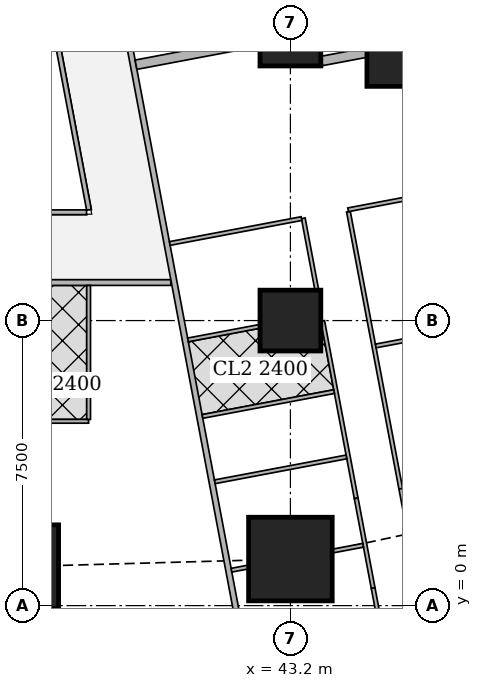
"""IFC4 building model, lengths in metres.
Left out: names, types, materials, properties, quantities, classifications, styles, units other than length and angle.
Written with IfcOpenShell. Run it as: python <this file> out.ifc"""

import sys

from ifc_helpers import new_model, si_unit, direction, frame, frame_2d, origin, origin_2d, place, context, subcontext, project, spatial, rectangle, extrude, element, fill, save


model = new_model("IFC4")
c1 = context("Model", 3, precision=1e-05, world=origin(), true_north=direction((0.0, 1.0)))
c2 = subcontext(c1, "Body", "Model", "MODEL_VIEW")
j1 = project(units=[si_unit("LENGTHUNIT", "METRE"), si_unit("PLANEANGLEUNIT", "RADIAN")], contexts=[c1])
p1 = place(None, origin())
s1 = spatial("IfcSite", under=j1, at=p1, CompositionType="ELEMENT")
p2 = place(p1, origin())
s2 = spatial("IfcBuilding", under=s1, at=p2, CompositionType="ELEMENT")
p3 = place(p2, frame((0.0, 0.0, 89.15)))
s3 = spatial("IfcBuildingStorey", under=s2, at=p3, CompositionType="ELEMENT", Elevation=89.15)
for number, where, z_axis, x_axis in (
    (1, (36.0, 1.025, 0.0), (0.0, 0.0, 1.0), (1.0, 0.0, 0.0)),
    (2, (43.2, 1.225, 0.0), (0.0, 0.0, 1.0), (1.0, 0.0, 0.0)),
):
    element("IfcColumn", number, at=place(p3, frame(where, z_axis=z_axis, x_axis=x_axis)), inside=s3, PredefinedType="COLUMN", context=c2, shape_type="SweptSolid", body=[
        extrude(rectangle(XDim=2.2, YDim=2.2, at=origin_2d()), origin(), (0.0, 0.0, 1.0), 3.75),
    ])
for number, where, z_axis, x_axis in (
    (3, (43.2, 7.5, 0.0), (0.0, 0.0, 1.0), (1.0, 0.0, 0.0)),
    (4, (43.2, 15.0, 0.0), (0.0, 0.0, 1.0), (1.0, 0.0, 0.0)),
):
    element("IfcColumn", number, at=place(p3, frame(where, z_axis=z_axis, x_axis=x_axis)), inside=s3, PredefinedType="COLUMN", context=c2, shape_type="SweptSolid", body=[
        extrude(rectangle(XDim=1.6, YDim=1.6, at=origin_2d()), origin(), (0.0, 0.0, 1.0), 3.75),
    ])
p4 = place(p3, frame((46.314, 14.763, 0.0), z_axis=(0.0, 0.0, 1.0), x_axis=(1.0, 0.0, 0.0)))
e5 = element("IfcColumn", 5, at=p4, inside=s3, PredefinedType="COLUMN", context=c2, shape_type="SweptSolid", body=[
    extrude(rectangle(XDim=2.2, YDim=2.2, at=origin_2d()), origin(), (0.0, 0.0, 1.0), 3.75),
])
p5 = place(p3, frame((50.653, 2.703, 0.0), z_axis=(0.0, 0.0, 1.0), x_axis=(-0.185612026696, 0.982623109613, 0.0)))
e6 = element("IfcWall", 6, at=p5, inside=s3, PredefinedType="SOLIDWALL", context=c2, shape_type="SweptSolid", body=[
    extrude(rectangle(XDim=41.393, YDim=0.2, at=frame_2d((20.697, 0.0))), origin(), (0.0, 0.0, 1.0), 3.5),
])
p6 = place(p5, frame((1.633, 0.0, 0.9)))
e7 = element("IfcOpeningElement", 7, at=p6, cuts=e6, PredefinedType="OPENING", context=c2, shape_type="SweptSolid", body=[
    extrude(rectangle(XDim=1.8, YDim=1.5, at=frame_2d((0.9, 0.75))), frame((0.0, 0.11, 0.0), z_axis=(0.0, -1.0, 0.0), x_axis=(1.0, 0.0, 0.0)), (0.0, 0.0, 1.0), 0.22),
])
p7 = place(p5, frame((6.032, 0.0, 0.9)))
e8 = element("IfcOpeningElement", 8, at=p7, cuts=e6, PredefinedType="OPENING", context=c2, shape_type="SweptSolid", body=[
    extrude(rectangle(XDim=1.8, YDim=1.5, at=frame_2d((0.9, 0.75))), frame((0.0, 0.11, 0.0), z_axis=(0.0, -1.0, 0.0), x_axis=(1.0, 0.0, 0.0)), (0.0, 0.0, 1.0), 0.22),
])
p8 = place(p5, frame((9.848, 0.0, 0.9)))
e9 = element("IfcOpeningElement", 9, at=p8, cuts=e6, PredefinedType="OPENING", context=c2, shape_type="SweptSolid", body=[
    extrude(rectangle(XDim=1.8, YDim=1.5, at=frame_2d((0.9, 0.75))), frame((0.0, 0.11, 0.0), z_axis=(0.0, -1.0, 0.0), x_axis=(1.0, 0.0, 0.0)), (0.0, 0.0, 1.0), 0.22),
])
p9 = place(p5, frame((13.664, 0.0, 0.9)))
e10 = element("IfcOpeningElement", 10, at=p9, cuts=e6, PredefinedType="OPENING", context=c2, shape_type="SweptSolid", body=[
    extrude(rectangle(XDim=1.8, YDim=1.5, at=frame_2d((0.9, 0.75))), frame((0.0, 0.11, 0.0), z_axis=(0.0, -1.0, 0.0), x_axis=(1.0, 0.0, 0.0)), (0.0, 0.0, 1.0), 0.22),
])
p10 = place(p5, frame((17.481, 0.0, 0.9)))
e11 = element("IfcOpeningElement", 11, at=p10, cuts=e6, PredefinedType="OPENING", context=c2, shape_type="SweptSolid", body=[
    extrude(rectangle(XDim=1.8, YDim=1.5, at=frame_2d((0.9, 0.75))), frame((0.0, 0.11, 0.0), z_axis=(0.0, -1.0, 0.0), x_axis=(1.0, 0.0, 0.0)), (0.0, 0.0, 1.0), 0.22),
])
p11 = place(p5, frame((21.297, 0.0, 0.9)))
e12 = element("IfcOpeningElement", 12, at=p11, cuts=e6, PredefinedType="OPENING", context=c2, shape_type="SweptSolid", body=[
    extrude(rectangle(XDim=1.8, YDim=1.5, at=frame_2d((0.9, 0.75))), frame((0.0, 0.11, 0.0), z_axis=(0.0, -1.0, 0.0), x_axis=(1.0, 0.0, 0.0)), (0.0, 0.0, 1.0), 0.22),
])
p12 = place(p5, frame((25.113, 0.0, 0.9)))
e13 = element("IfcOpeningElement", 13, at=p12, cuts=e6, PredefinedType="OPENING", context=c2, shape_type="SweptSolid", body=[
    extrude(rectangle(XDim=1.8, YDim=1.5, at=frame_2d((0.9, 0.75))), frame((0.0, 0.11, 0.0), z_axis=(0.0, -1.0, 0.0), x_axis=(1.0, 0.0, 0.0)), (0.0, 0.0, 1.0), 0.22),
])
p13 = place(p5, frame((28.93, 0.0, 0.9)))
e14 = element("IfcOpeningElement", 14, at=p13, cuts=e6, PredefinedType="OPENING", context=c2, shape_type="SweptSolid", body=[
    extrude(rectangle(XDim=1.8, YDim=1.5, at=frame_2d((0.9, 0.75))), frame((0.0, 0.11, 0.0), z_axis=(0.0, -1.0, 0.0), x_axis=(1.0, 0.0, 0.0)), (0.0, 0.0, 1.0), 0.22),
])
p14 = place(p5, frame((32.746, 0.0, 0.9)))
e15 = element("IfcOpeningElement", 15, at=p14, cuts=e6, PredefinedType="OPENING", context=c2, shape_type="SweptSolid", body=[
    extrude(rectangle(XDim=1.8, YDim=1.5, at=frame_2d((0.9, 0.75))), frame((0.0, 0.11, 0.0), z_axis=(0.0, -1.0, 0.0), x_axis=(1.0, 0.0, 0.0)), (0.0, 0.0, 1.0), 0.22),
])
p15 = place(p5, frame((36.481, 0.0, 0.9)))
e16 = element("IfcOpeningElement", 16, at=p15, cuts=e6, PredefinedType="OPENING", context=c2, shape_type="SweptSolid", body=[
    extrude(rectangle(XDim=1.8, YDim=1.5, at=frame_2d((0.9, 0.75))), frame((0.0, 0.11, 0.0), z_axis=(0.0, -1.0, 0.0), x_axis=(1.0, 0.0, 0.0)), (0.0, 0.0, 1.0), 0.22),
])
p16 = place(p3, frame((40.053, 8.5, 0.0), z_axis=(0.0, 0.0, 1.0), x_axis=(-1.0, 0.0, 0.0)))
e17 = element("IfcWall", 17, at=p16, inside=s3, PredefinedType="SOLIDWALL", context=c2, shape_type="SweptSolid", body=[
    extrude(rectangle(XDim=31.703, YDim=0.15, at=frame_2d((15.852, 0.0))), origin(), (0.0, 0.0, 1.0), 3.5),
])
p17 = place(p16, frame((28.103, 0.0, 0.0)))
e18 = element("IfcOpeningElement", 18, at=p17, cuts=e17, PredefinedType="OPENING", context=c2, shape_type="SweptSolid", body=[
    extrude(rectangle(XDim=1.0, YDim=2.1, at=frame_2d((0.5, 1.05))), frame((0.0, 0.085, 0.0), z_axis=(0.0, -1.0, 0.0), x_axis=(1.0, 0.0, 0.0)), (0.0, 0.0, 1.0), 0.17),
])
p18 = place(p16, frame((19.953, 0.0, 0.0)))
e19 = element("IfcOpeningElement", 19, at=p18, cuts=e17, PredefinedType="OPENING", context=c2, shape_type="SweptSolid", body=[
    extrude(rectangle(XDim=1.0, YDim=2.1, at=frame_2d((0.5, 1.05))), frame((0.0, 0.085, 0.0), z_axis=(0.0, -1.0, 0.0), x_axis=(1.0, 0.0, 0.0)), (0.0, 0.0, 1.0), 0.17),
])
p19 = place(p16, frame((12.753, 0.0, 0.0)))
e20 = element("IfcOpeningElement", 20, at=p19, cuts=e17, PredefinedType="OPENING", context=c2, shape_type="SweptSolid", body=[
    extrude(rectangle(XDim=1.0, YDim=2.1, at=frame_2d((0.5, 1.05))), frame((0.0, 0.085, 0.0), z_axis=(0.0, -1.0, 0.0), x_axis=(1.0, 0.0, 0.0)), (0.0, 0.0, 1.0), 0.17),
])
p20 = place(p16, frame((0.15, 0.0, 0.0)))
e21 = element("IfcOpeningElement", 21, at=p20, cuts=e17, PredefinedType="OPENING", context=c2, shape_type="SweptSolid", body=[
    extrude(rectangle(XDim=1.0, YDim=2.1, at=frame_2d((0.5, 1.05))), frame((0.0, 0.085, 0.0), z_axis=(0.0, -1.0, 0.0), x_axis=(1.0, 0.0, 0.0)), (0.0, 0.0, 1.0), 0.17),
])
p21 = place(p3, frame((33.127, 45.65, 0.0), z_axis=(0.0, 0.0, 1.0), x_axis=(0.185598547723, -0.98262565562, 0.0)))
e22 = element("IfcWall", 22, at=p21, inside=s3, PredefinedType="SOLIDWALL", context=c2, shape_type="SweptSolid", body=[
    extrude(rectangle(XDim=47.118, YDim=0.15, at=frame_2d((23.559, 0.0))), origin(), (0.0, 0.0, 1.0), 2.2),
])
p22 = place(p21, frame((15.285, 0.0, 0.0)))
e23 = element("IfcOpeningElement", 23, at=p22, cuts=e22, PredefinedType="OPENING", context=c2, shape_type="SweptSolid", body=[
    extrude(rectangle(XDim=1.0, YDim=2.1, at=frame_2d((0.5, 1.05))), frame((0.0, 0.085, 0.0), z_axis=(0.0, -1.0, 0.0), x_axis=(1.0, 0.0, 0.0)), (0.0, 0.0, 1.0), 0.17),
])
p23 = place(p21, frame((19.102, 0.0, 0.0)))
e24 = element("IfcOpeningElement", 24, at=p23, cuts=e22, PredefinedType="OPENING", context=c2, shape_type="SweptSolid", body=[
    extrude(rectangle(XDim=1.0, YDim=2.1, at=frame_2d((0.5, 1.05))), frame((0.0, 0.085, 0.0), z_axis=(0.0, -1.0, 0.0), x_axis=(1.0, 0.0, 0.0)), (0.0, 0.0, 1.0), 0.17),
])
p24 = place(p21, frame((33.88, 0.0, 0.0)))
e25 = element("IfcOpeningElement", 25, at=p24, cuts=e22, PredefinedType="OPENING", context=c2, shape_type="SweptSolid", body=[
    extrude(rectangle(XDim=1.0, YDim=2.1, at=frame_2d((0.5, 1.05))), frame((0.0, 0.085, 0.0), z_axis=(0.0, -1.0, 0.0), x_axis=(1.0, 0.0, 0.0)), (0.0, 0.0, 1.0), 0.17),
])
p25 = place(p3, frame((37.89, 4.85, 0.0), z_axis=(0.0, 0.0, 1.0), x_axis=(-1.0, 0.0, 0.0)))
e26 = element("IfcWall", 26, at=p25, inside=s3, PredefinedType="PARTITIONING", context=c2, shape_type="SweptSolid", body=[
    extrude(rectangle(XDim=1.765, YDim=0.1, at=frame_2d((0.882, 0.0))), origin(), (0.0, 0.0, 1.0), 3.5),
])
p26 = place(p25, frame((0.49, 0.0, 0.0)))
e27 = element("IfcOpeningElement", 27, at=p26, cuts=e26, PredefinedType="OPENING", context=c2, shape_type="SweptSolid", body=[
    extrude(rectangle(XDim=0.9, YDim=2.1, at=frame_2d((0.45, 1.05))), frame((0.0, 0.06, 0.0), z_axis=(0.0, -1.0, 0.0), x_axis=(1.0, 0.0, 0.0)), (0.0, 0.0, 1.0), 0.12),
])
p27 = place(p3, frame((37.89, 4.9, 0.0), z_axis=(0.0, 0.0, 1.0), x_axis=(0.0, 1.0, 0.0)))
e28 = element("IfcWall", 28, at=p27, inside=s3, PredefinedType="PARTITIONING", context=c2, shape_type="SweptSolid", body=[
    extrude(rectangle(XDim=3.525, YDim=0.1, at=frame_2d((1.763, 0.0))), origin(), (0.0, 0.0, 1.0), 3.5),
])
p28 = place(p3, frame((44.727, 10.366, 0.0), z_axis=(0.0, 0.0, 1.0), x_axis=(0.185678775129, -0.982610498858, 0.0)))
e29 = element("IfcWall", 29, at=p28, inside=s3, PredefinedType="PARTITIONING", context=c2, shape_type="SweptSolid", body=[
    extrude(rectangle(XDim=7.421, YDim=0.1, at=frame_2d((3.71, 0.0))), origin(), (0.0, 0.0, 1.0), 3.5),
])
p29 = place(p28, frame((0.151, 0.0, 0.0)))
e30 = element("IfcOpeningElement", 30, at=p29, cuts=e29, PredefinedType="OPENING", context=c2, shape_type="SweptSolid", body=[
    extrude(rectangle(XDim=0.9, YDim=2.1, at=frame_2d((0.45, 1.05))), frame((0.0, 0.06, 0.0), z_axis=(0.0, -1.0, 0.0), x_axis=(1.0, 0.0, 0.0)), (0.0, 0.0, 1.0), 0.12),
])
p30 = place(p28, frame((4.55, 0.0, 0.0)))
e31 = element("IfcOpeningElement", 31, at=p30, cuts=e29, PredefinedType="OPENING", context=c2, shape_type="SweptSolid", body=[
    extrude(rectangle(XDim=0.9, YDim=2.1, at=frame_2d((0.45, 1.05))), frame((0.0, 0.06, 0.0), z_axis=(0.0, -1.0, 0.0), x_axis=(1.0, 0.0, 0.0)), (0.0, 0.0, 1.0), 0.12),
])
p31 = place(p3, frame((46.105, 3.074, 0.0), z_axis=(0.0, 0.0, 1.0), x_axis=(0.185897769544, -0.982569091351, 0.0)))
e32 = element("IfcWall", 32, at=p31, inside=s3, PredefinedType="PARTITIONING", context=c2, shape_type="SweptSolid", body=[
    extrude(rectangle(XDim=1.044, YDim=0.1, at=frame_2d((0.522, 0.0))), origin(), (0.0, 0.0, 1.0), 2.05),
])
p32 = place(p3, frame((43.539, 10.192, 0.0), z_axis=(0.0, 0.0, 1.0), x_axis=(0.185366049966, -0.982669541362, 0.0)))
e33 = element("IfcWall", 33, at=p32, inside=s3, PredefinedType="PARTITIONING", context=c2, shape_type="SweptSolid", body=[
    extrude(rectangle(XDim=1.915, YDim=0.1, at=frame_2d((0.958, 0.0))), origin(), (0.0, 0.0, 1.0), 3.5),
])
p33 = place(p3, frame((44.049, 7.49, 0.0), z_axis=(0.0, 0.0, 1.0), x_axis=(0.185666332607, -0.982612849975, 0.0)))
e34 = element("IfcWall", 34, at=p33, inside=s3, PredefinedType="PARTITIONING", context=c2, shape_type="SweptSolid", body=[
    extrude(rectangle(XDim=4.75, YDim=0.1, at=frame_2d((2.375, 0.0))), origin(), (0.0, 0.0, 1.0), 3.5),
])
p34 = place(p33, frame((0.8, 0.0, 0.0)))
e35 = element("IfcOpeningElement", 35, at=p34, cuts=e34, PredefinedType="OPENING", context=c2, shape_type="SweptSolid", body=[
    extrude(rectangle(XDim=0.9, YDim=2.1, at=frame_2d((0.45, 1.05))), frame((0.0, 0.06, 0.0), z_axis=(0.0, -1.0, 0.0), x_axis=(1.0, 0.0, 0.0)), (0.0, 0.0, 1.0), 0.12),
])
p35 = place(p33, frame((2.315, 0.0, 0.0)))
e36 = element("IfcOpeningElement", 36, at=p35, cuts=e34, PredefinedType="OPENING", context=c2, shape_type="SweptSolid", body=[
    extrude(rectangle(XDim=0.9, YDim=2.1, at=frame_2d((0.45, 1.05))), frame((0.0, 0.06, 0.0), z_axis=(0.0, -1.0, 0.0), x_axis=(1.0, 0.0, 0.0)), (0.0, 0.0, 1.0), 0.12),
])
p36 = place(p3, frame((44.931, 2.823, 0.0), z_axis=(0.0, 0.0, 1.0), x_axis=(0.185631845838, -0.982619365681, 0.0)))
e37 = element("IfcWall", 37, at=p36, inside=s3, PredefinedType="PARTITIONING", context=c2, shape_type="SweptSolid", body=[
    extrude(rectangle(XDim=2.403, YDim=0.1, at=frame_2d((1.201, 0.0))), origin(), (0.0, 0.0, 1.0), 2.05),
])
p37 = place(p3, frame((45.377, 0.462, 0.0), z_axis=(0.0, 0.0, 1.0), x_axis=(0.185513480919, -0.982641719243, 0.0)))
e38 = element("IfcWall", 38, at=p37, inside=s3, PredefinedType="PARTITIONING", context=c2, shape_type="SweptSolid", body=[
    extrude(rectangle(XDim=1.095, YDim=0.1, at=frame_2d((0.547, 0.0))), origin(), (0.0, 0.0, 1.0), 3.5),
])
p38 = place(p3, frame((48.943, 11.213, 0.0), z_axis=(0.0, 0.0, 1.0), x_axis=(-0.982633535512, -0.185556823879, 0.0)))
e39 = element("IfcWall", 39, at=p38, inside=s3, PredefinedType="PARTITIONING", context=c2, shape_type="SweptSolid", body=[
    extrude(rectangle(XDim=4.3, YDim=0.1, at=frame_2d((2.15, 0.0))), origin(), (0.0, 0.0, 1.0), 2.2),
])
p39 = place(p3, frame((46.62, 7.053, 0.0), z_axis=(0.0, 0.0, 1.0), x_axis=(-0.982749355621, -0.18494243436, 0.0)))
e40 = element("IfcWall", 40, at=p39, inside=s3, PredefinedType="PARTITIONING", context=c2, shape_type="SweptSolid", body=[
    extrude(rectangle(XDim=1.195, YDim=0.1, at=frame_2d((0.597, 0.0))), origin(), (0.0, 0.0, 1.0), 2.05),
])
p40 = place(p3, frame((43.49, 10.183, 0.0), z_axis=(0.0, 0.0, 1.0), x_axis=(-0.982588017646, -0.185797706064, 0.0)))
e41 = element("IfcWall", 41, at=p40, inside=s3, PredefinedType="PARTITIONING", context=c2, shape_type="SweptSolid", body=[
    extrude(rectangle(XDim=3.525, YDim=0.1, at=frame_2d((1.763, 0.0))), origin(), (0.0, 0.0, 1.0), 3.5),
])
p41 = place(p40, frame((1.325, 0.0, 0.0)))
e42 = element("IfcOpeningElement", 42, at=p41, cuts=e41, PredefinedType="OPENING", context=c2, shape_type="SweptSolid", body=[
    extrude(rectangle(XDim=0.9, YDim=2.1, at=frame_2d((0.45, 1.05))), frame((0.0, 0.06, 0.0), z_axis=(0.0, -1.0, 0.0), x_axis=(1.0, 0.0, 0.0)), (0.0, 0.0, 1.0), 0.12),
])
p42 = place(p3, frame((42.39, 7.347, 0.0), z_axis=(0.0, 0.0, 1.0), x_axis=(-0.982633642782, -0.185556255819, 0.0)))
e43 = element("IfcWall", 43, at=p42, inside=s3, PredefinedType="PARTITIONING", context=c2, shape_type="SweptSolid", body=[
    extrude(rectangle(XDim=1.918, YDim=0.1, at=frame_2d((0.959, 0.0))), origin(), (0.0, 0.0, 1.0), 3.5),
])
p43 = place(p3, frame((45.114, 1.587, 0.0), z_axis=(0.0, 0.0, 1.0), x_axis=(-0.982624706348, -0.185603573443, 0.0)))
e44 = element("IfcWall", 44, at=p43, inside=s3, PredefinedType="PARTITIONING", context=c2, shape_type="SweptSolid", body=[
    extrude(rectangle(XDim=0.818, YDim=0.1, at=frame_2d((0.409, 0.0))), origin(), (0.0, 0.0, 1.0), 2.05),
])
p44 = place(p3, frame((42.09, 1.015, 0.0), z_axis=(0.0, 0.0, 1.0), x_axis=(-0.982680384557, -0.185308558375, 0.0)))
e45 = element("IfcWall", 45, at=p44, inside=s3, PredefinedType="PARTITIONING", context=c2, shape_type="SweptSolid", body=[
    extrude(rectangle(XDim=0.448, YDim=0.1, at=frame_2d((0.224, 0.0))), origin(), (0.0, 0.0, 1.0), 2.05),
])
p45 = place(p3, frame((44.35, 5.631, 0.0), z_axis=(0.0, 0.0, 1.0), x_axis=(-0.982638553676, -0.185530247748, 0.0)))
e46 = element("IfcWall", 46, at=p45, inside=s3, PredefinedType="PARTITIONING", context=c2, shape_type="SweptSolid", body=[
    extrude(rectangle(XDim=3.525, YDim=0.1, at=frame_2d((1.763, 0.0))), origin(), (0.0, 0.0, 1.0), 3.5),
])
p46 = place(p3, frame((45.19, 14.55, 0.0), z_axis=(0.0, 0.0, 1.0), x_axis=(-0.982666604435, -0.185381618634, 0.0)))
e47 = element("IfcWall", 47, at=p46, inside=s3, PredefinedType="SOLIDWALL", context=c2, shape_type="SweptSolid", body=[
    extrude(rectangle(XDim=1.187, YDim=0.25, at=frame_2d((0.593, 0.0))), origin(), (0.0, 0.0, 1.0), 3.5),
])
p47 = place(p3, frame((42.376, 14.844, 0.0), z_axis=(0.0, 0.0, 1.0), x_axis=(-0.982610440948, -0.18567908159, 0.0)))
e48 = element("IfcWall", 48, at=p47, inside=s3, PredefinedType="SOLIDWALL", context=c2, shape_type="SweptSolid", body=[
    extrude(rectangle(XDim=3.296, YDim=0.25, at=frame_2d((1.648, 0.0))), origin(), (0.0, 0.0, 1.0), 3.5),
])
p48 = place(p3, frame((41.21, 3.258, 0.0), z_axis=(0.0, 0.0, 1.0), x_axis=(0.982638553676, 0.185530247748, 0.0)))
e49 = element("IfcWall", 49, at=p48, inside=s3, PredefinedType="PARTITIONING", context=c2, shape_type="SweptSolid", body=[
    extrude(rectangle(XDim=3.525, YDim=0.1, at=frame_2d((1.763, 0.0))), origin(), (0.0, 0.0, 1.0), 3.5),
])
p49 = place(p48, frame((1.65, 0.0, 0.0)))
e50 = element("IfcOpeningElement", 50, at=p49, cuts=e49, PredefinedType="OPENING", context=c2, shape_type="SweptSolid", body=[
    extrude(rectangle(XDim=0.9, YDim=2.1, at=frame_2d((0.45, 1.05))), frame((0.0, 0.06, 0.0), z_axis=(0.0, -1.0, 0.0), x_axis=(1.0, 0.0, 0.0)), (0.0, 0.0, 1.0), 0.12),
])
p50 = place(p3, frame((28.95, 10.35, 0.0), z_axis=(0.0, 0.0, 1.0), x_axis=(1.0, 0.0, 0.0)))
e51 = element("IfcWall", 51, at=p50, inside=s3, PredefinedType="PARTITIONING", context=c2, shape_type="SweptSolid", body=[
    extrude(rectangle(XDim=8.886, YDim=0.125, at=frame_2d((4.443, 0.0))), origin(), (0.0, 0.0, 1.0), 3.5),
])
p51 = place(p3, frame((37.9, 10.413, 0.0), z_axis=(0.0, 0.0, 1.0), x_axis=(-0.185589740669, 0.982627319058, 0.0)))
e52 = element("IfcWall", 52, at=p51, inside=s3, PredefinedType="PARTITIONING", context=c2, shape_type="SweptSolid", body=[
    extrude(rectangle(XDim=24.602, YDim=0.125, at=frame_2d((12.301, 0.0))), origin(), (0.0, 0.0, 1.0), 2.5),
])
p52 = place(p51, frame((0.708, 0.0, 0.0)))
e53 = element("IfcOpeningElement", 53, at=p52, cuts=e52, PredefinedType="OPENING", context=c2, shape_type="SweptSolid", body=[
    extrude(rectangle(XDim=1.0, YDim=2.1, at=frame_2d((0.5, 1.05))), frame((0.0, 0.073, 0.0), z_axis=(0.0, -1.0, 0.0), x_axis=(1.0, 0.0, 0.0)), (0.0, 0.0, 1.0), 0.145),
])
p53 = place(p51, frame((5.75, 0.0, 0.0)))
e54 = element("IfcOpeningElement", 54, at=p53, cuts=e52, PredefinedType="OPENING", context=c2, shape_type="SweptSolid", body=[
    extrude(rectangle(XDim=1.0, YDim=2.1, at=frame_2d((0.5, 1.05))), frame((0.0, 0.073, 0.0), z_axis=(0.0, -1.0, 0.0), x_axis=(1.0, 0.0, 0.0)), (0.0, 0.0, 1.0), 0.145),
])
p54 = place(p51, frame((13.124, 0.0, 0.0)))
e55 = element("IfcOpeningElement", 55, at=p54, cuts=e52, PredefinedType="OPENING", context=c2, shape_type="SweptSolid", body=[
    extrude(rectangle(XDim=1.0, YDim=2.1, at=frame_2d((0.5, 1.05))), frame((0.0, 0.073, 0.0), z_axis=(0.0, -1.0, 0.0), x_axis=(1.0, 0.0, 0.0)), (0.0, 0.0, 1.0), 0.145),
])
p55 = place(p51, frame((16.94, 0.0, 0.0)))
e56 = element("IfcOpeningElement", 56, at=p55, cuts=e52, PredefinedType="OPENING", context=c2, shape_type="SweptSolid", body=[
    extrude(rectangle(XDim=1.0, YDim=2.1, at=frame_2d((0.5, 1.05))), frame((0.0, 0.073, 0.0), z_axis=(0.0, -1.0, 0.0), x_axis=(1.0, 0.0, 0.0)), (0.0, 0.0, 1.0), 0.145),
])
p56 = place(p51, frame((21.0, 0.0, 0.0)))
e57 = element("IfcOpeningElement", 57, at=p56, cuts=e52, PredefinedType="OPENING", context=c2, shape_type="SweptSolid", body=[
    extrude(rectangle(XDim=1.0, YDim=2.1, at=frame_2d((0.5, 1.05))), frame((0.0, 0.073, 0.0), z_axis=(0.0, -1.0, 0.0), x_axis=(1.0, 0.0, 0.0)), (0.0, 0.0, 1.0), 0.145),
])
p57 = place(p26, origin())
e58 = element("IfcDoor", 58, at=p57, inside=s3, OperationType="SINGLE_SWING_LEFT", PredefinedType="DOOR", context=c2, shape_type="SweptSolid", body=[
    extrude(rectangle(XDim=0.9, YDim=2.1, at=frame_2d((0.45, 1.05))), frame((0.0, 0.025, 0.0), z_axis=(0.0, -1.0, 0.0), x_axis=(1.0, 0.0, 0.0)), (0.0, 0.0, 1.0), 0.05),
])
fill(e27, e58)
p58 = place(p20, origin())
e59 = element("IfcDoor", 59, at=p58, inside=s3, OperationType="SINGLE_SWING_LEFT", PredefinedType="DOOR", context=c2, shape_type="SweptSolid", body=[
    extrude(rectangle(XDim=1.0, YDim=2.1, at=frame_2d((0.5, 1.05))), frame((0.0, 0.025, 0.0), z_axis=(0.0, -1.0, 0.0), x_axis=(1.0, 0.0, 0.0)), (0.0, 0.0, 1.0), 0.05),
])
fill(e21, e59)
p59 = place(p29, origin())
e60 = element("IfcDoor", 60, at=p59, inside=s3, OperationType="SINGLE_SWING_LEFT", PredefinedType="DOOR", context=c2, shape_type="SweptSolid", body=[
    extrude(rectangle(XDim=0.9, YDim=2.1, at=frame_2d((0.45, 1.05))), frame((0.0, 0.025, 0.0), z_axis=(0.0, -1.0, 0.0), x_axis=(1.0, 0.0, 0.0)), (0.0, 0.0, 1.0), 0.05),
])
fill(e30, e60)
p60 = place(p30, origin())
e61 = element("IfcDoor", 61, at=p60, inside=s3, OperationType="SINGLE_SWING_LEFT", PredefinedType="DOOR", context=c2, shape_type="SweptSolid", body=[
    extrude(rectangle(XDim=0.9, YDim=2.1, at=frame_2d((0.45, 1.05))), frame((0.0, 0.025, 0.0), z_axis=(0.0, -1.0, 0.0), x_axis=(1.0, 0.0, 0.0)), (0.0, 0.0, 1.0), 0.05),
])
fill(e31, e61)
p61 = place(p34, origin())
e62 = element("IfcDoor", 62, at=p61, inside=s3, OperationType="SINGLE_SWING_LEFT", PredefinedType="DOOR", context=c2, shape_type="SweptSolid", body=[
    extrude(rectangle(XDim=0.9, YDim=2.1, at=frame_2d((0.45, 1.05))), frame((0.0, 0.025, 0.0), z_axis=(0.0, -1.0, 0.0), x_axis=(1.0, 0.0, 0.0)), (0.0, 0.0, 1.0), 0.05),
])
fill(e35, e62)
p62 = place(p35, origin())
e63 = element("IfcDoor", 63, at=p62, inside=s3, OperationType="SINGLE_SWING_LEFT", PredefinedType="DOOR", context=c2, shape_type="SweptSolid", body=[
    extrude(rectangle(XDim=0.9, YDim=2.1, at=frame_2d((0.45, 1.05))), frame((0.0, 0.025, 0.0), z_axis=(0.0, -1.0, 0.0), x_axis=(1.0, 0.0, 0.0)), (0.0, 0.0, 1.0), 0.05),
])
fill(e36, e63)
p63 = place(p24, origin())
e64 = element("IfcDoor", 64, at=p63, inside=s3, OperationType="SINGLE_SWING_LEFT", PredefinedType="DOOR", context=c2, shape_type="SweptSolid", body=[
    extrude(rectangle(XDim=1.0, YDim=2.1, at=frame_2d((0.5, 1.05))), frame((0.0, 0.025, 0.0), z_axis=(0.0, -1.0, 0.0), x_axis=(1.0, 0.0, 0.0)), (0.0, 0.0, 1.0), 0.05),
])
fill(e25, e64)
p64 = place(p41, origin())
e65 = element("IfcDoor", 65, at=p64, inside=s3, OperationType="SINGLE_SWING_RIGHT", PredefinedType="DOOR", context=c2, shape_type="SweptSolid", body=[
    extrude(rectangle(XDim=0.9, YDim=2.1, at=frame_2d((0.45, 1.05))), frame((0.0, 0.025, 0.0), z_axis=(0.0, -1.0, 0.0), x_axis=(1.0, 0.0, 0.0)), (0.0, 0.0, 1.0), 0.05),
])
fill(e42, e65)
p65 = place(p49, origin())
e66 = element("IfcDoor", 66, at=p65, inside=s3, OperationType="SINGLE_SWING_RIGHT", PredefinedType="DOOR", context=c2, shape_type="SweptSolid", body=[
    extrude(rectangle(XDim=0.9, YDim=2.1, at=frame_2d((0.45, 1.05))), frame((0.0, 0.025, 0.0), z_axis=(0.0, -1.0, 0.0), x_axis=(1.0, 0.0, 0.0)), (0.0, 0.0, 1.0), 0.05),
])
fill(e50, e66)
p66 = place(p52, origin())
e67 = element("IfcDoor", 67, at=p66, inside=s3, OperationType="SINGLE_SWING_LEFT", PredefinedType="DOOR", context=c2, shape_type="SweptSolid", body=[
    extrude(rectangle(XDim=1.0, YDim=2.1, at=frame_2d((0.5, 1.05))), frame((0.0, 0.025, 0.0), z_axis=(0.0, -1.0, 0.0), x_axis=(1.0, 0.0, 0.0)), (0.0, 0.0, 1.0), 0.05),
])
fill(e53, e67)
save(model, sys.argv[1])
